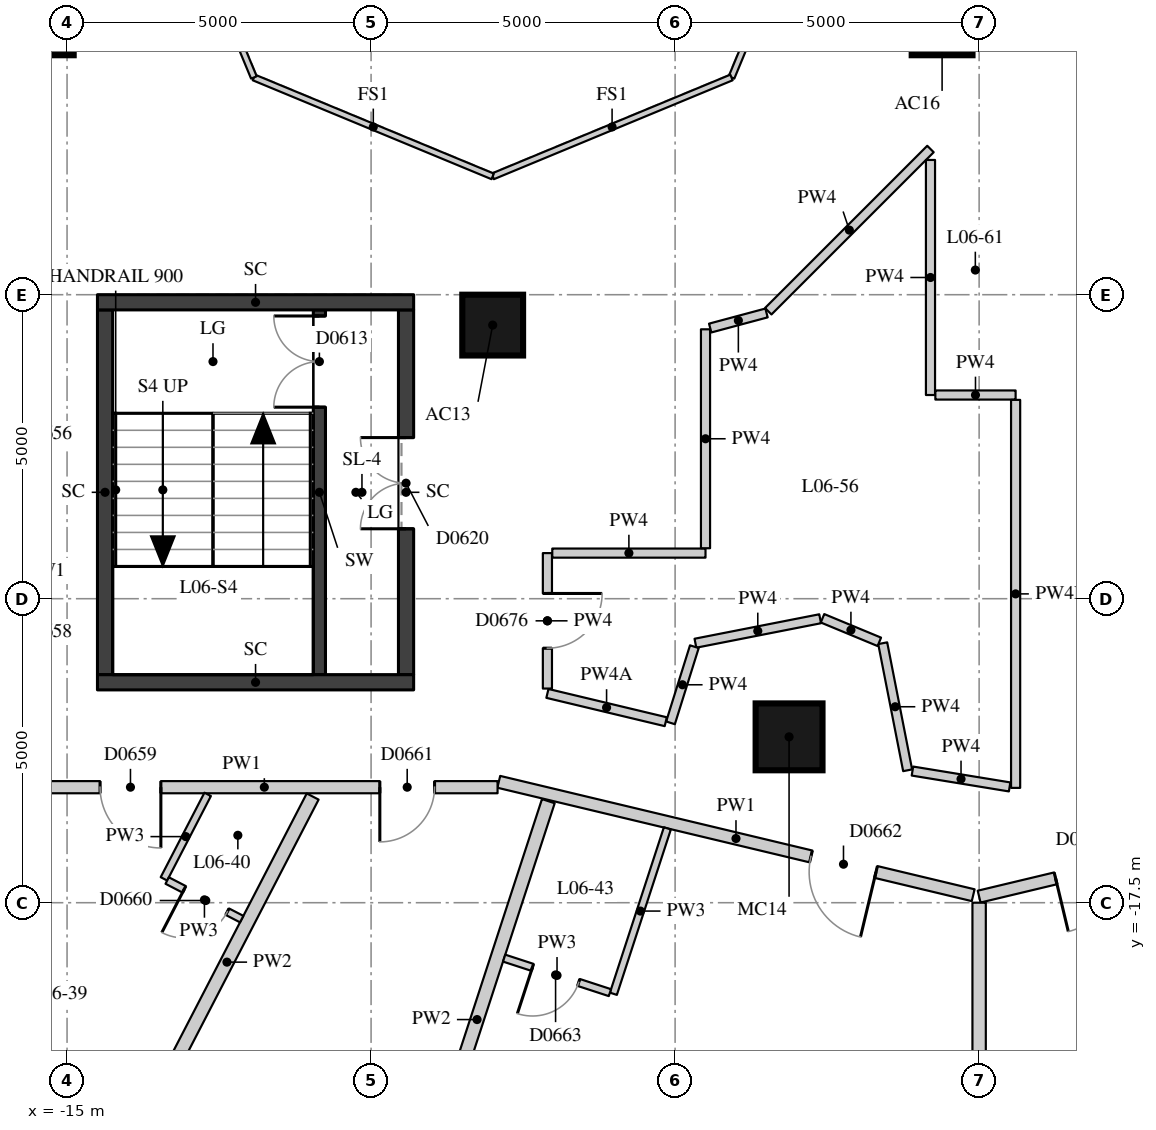
"""IFC4 building model, lengths in metres.
Left out: names, types, materials, properties, quantities, classifications, styles, units other than length and angle.
Written with IfcOpenShell. Run it as: python <this file> out.ifc"""

import sys

from ifc_helpers import new_model, si_unit, direction, frame, frame_2d, origin, origin_2d, place, context, subcontext, project, spatial, rectangle, extrude, element, fill, save


model = new_model("IFC4")
c1 = context("Model", 3, precision=1e-05, world=origin(), true_north=direction((0.0, 1.0)))
c2 = subcontext(c1, "Body", "Model", "MODEL_VIEW")
j1 = project(units=[si_unit("LENGTHUNIT", "METRE"), si_unit("PLANEANGLEUNIT", "RADIAN")], contexts=[c1])
p1 = place(None, origin())
s1 = spatial("IfcSite", under=j1, at=p1, CompositionType="ELEMENT")
p2 = place(p1, origin())
s2 = spatial("IfcBuilding", under=s1, at=p2, CompositionType="ELEMENT")
p3 = place(p2, frame((0.0, 0.0, 28.3)))
s3 = spatial("IfcBuildingStorey", under=s2, at=p3, CompositionType="ELEMENT", Elevation=28.3)
for number, where, z_axis, x_axis in (
    (1, (-15.391, -3.062, 0.0), (0.0, 0.0, 1.0), (1.0, 0.0, 0.0)),
    (2, (-8.0, -8.0, 0.0), (0.0, 0.0, 1.0), (1.0, 0.0, 0.0)),
    (3, (-0.609, -3.062, 0.0), (0.0, 0.0, 1.0), (1.0, 0.0, 0.0)),
):
    element("IfcColumn", number, at=place(p3, frame(where, z_axis=z_axis, x_axis=x_axis)), inside=s3, PredefinedType="COLUMN", context=c2, shape_type="SweptSolid", body=[
        extrude(rectangle(XDim=1.0, YDim=1.0, at=origin_2d()), origin(), (0.0, 0.0, 1.0), 3.3),
    ])
p4 = place(p3, frame((-3.126, -14.772, 0.0), z_axis=(0.0, 0.0, 1.0), x_axis=(1.0, 0.0, 0.0)))
e4 = element("IfcColumn", 4, at=p4, inside=s3, PredefinedType="COLUMN", context=c2, shape_type="SweptSolid", body=[
    extrude(rectangle(XDim=1.1, YDim=1.1, at=origin_2d()), origin(), (0.0, 0.0, 1.0), 3.3),
])
p5 = place(p3, frame((-18.023, -20.044, 0.0), z_axis=(0.0, 0.0, 1.0), x_axis=(0.847635480093, -0.530579016629, 0.0)))
e5 = element("IfcWall", 5, at=p5, inside=s3, PredefinedType="SOLIDWALL", context=c2, shape_type="SweptSolid", body=[
    extrude(rectangle(XDim=3.782, YDim=0.45, at=frame_2d((1.891, 0.0))), origin(), (0.0, 0.0, 1.0), 3.02),
])
p6 = place(p5, frame((0.791, 0.0, 0.4)))
e6 = element("IfcOpeningElement", 6, at=p6, cuts=e5, PredefinedType="OPENING", context=c2, shape_type="SweptSolid", body=[
    extrude(rectangle(XDim=2.2, YDim=1.75, at=frame_2d((1.1, 0.875))), frame((0.0, 0.235, 0.0), z_axis=(0.0, -1.0, 0.0), x_axis=(1.0, 0.0, 0.0)), (0.0, 0.0, 1.0), 0.47),
])
p7 = place(p3, frame((-10.85, -13.75, 0.0), z_axis=(0.0, 0.0, 1.0), x_axis=(0.0, 1.0, 0.0)))
e7 = element("IfcWall", 7, at=p7, inside=s3, PredefinedType="SHEAR", context=c2, shape_type="SweptSolid", body=[
    extrude(rectangle(XDim=6.0, YDim=0.2, at=frame_2d((3.0, 0.0))), origin(), (0.0, 0.0, 1.0), 3.02),
])
p8 = place(p7, frame((4.4, 0.0, 0.0)))
e8 = element("IfcOpeningElement", 8, at=p8, cuts=e7, PredefinedType="OPENING", context=c2, shape_type="SweptSolid", body=[
    extrude(rectangle(XDim=1.5, YDim=2.1, at=frame_2d((0.75, 1.05))), frame((0.0, 0.11, 0.0), z_axis=(0.0, -1.0, 0.0), x_axis=(1.0, 0.0, 0.0)), (0.0, 0.0, 1.0), 0.22),
])
p9 = place(p3, frame((-14.375, -13.75, -0.28), z_axis=(0.0, 0.0, 1.0), x_axis=(0.0, 1.0, 0.0)))
e9 = element("IfcWall", 9, at=p9, inside=s3, PredefinedType="SHEAR", context=c2, shape_type="SweptSolid", body=[
    extrude(rectangle(XDim=6.0, YDim=0.25, at=frame_2d((3.0, 0.0))), origin(), (0.0, 0.0, 1.0), 3.3),
])
p10 = place(p3, frame((-9.425, -13.75, -0.28), z_axis=(0.0, 0.0, 1.0), x_axis=(0.0, 1.0, 0.0)))
e10 = element("IfcWall", 10, at=p10, inside=s3, PredefinedType="SHEAR", context=c2, shape_type="SweptSolid", body=[
    extrude(rectangle(XDim=6.0, YDim=0.25, at=frame_2d((3.0, 0.0))), origin(), (0.0, 0.0, 1.0), 3.3),
])
p11 = place(p10, frame((2.4, 0.0, 0.28)))
e11 = element("IfcOpeningElement", 11, at=p11, cuts=e10, PredefinedType="OPENING", context=c2, shape_type="SweptSolid", body=[
    extrude(rectangle(XDim=1.5, YDim=2.1, at=frame_2d((0.75, 1.05))), frame((0.0, 0.135, 0.0), z_axis=(0.0, -1.0, 0.0), x_axis=(1.0, 0.0, 0.0)), (0.0, 0.0, 1.0), 0.27),
])
for number, where, z_axis, x_axis in (
    (12, (-14.5, -7.625, -0.28), (0.0, 0.0, 1.0), (1.0, 0.0, 0.0)),
    (13, (-14.5, -13.875, -0.28), (0.0, 0.0, 1.0), (1.0, 0.0, 0.0)),
):
    element("IfcWall", number, at=place(p3, frame(where, z_axis=z_axis, x_axis=x_axis)), inside=s3, PredefinedType="SHEAR", context=c2, shape_type="SweptSolid", body=[
        extrude(rectangle(XDim=5.2, YDim=0.25, at=frame_2d((2.6, 0.0))), origin(), (0.0, 0.0, 1.0), 3.3),
    ])
p12 = place(p3, frame((10.488, -14.893, 0.0), z_axis=(0.0, 0.0, 1.0), x_axis=(-0.972603489924, -0.23247032367, 0.0)))
e14 = element("IfcWall", 14, at=p12, inside=s3, PredefinedType="PARTITIONING", context=c2, shape_type="SweptSolid", body=[
    extrude(rectangle(XDim=10.783, YDim=0.2, at=frame_2d((5.392, 0.0))), origin(), (0.0, 0.0, 1.0), 3.02),
])
p13 = place(p12, frame((8.59, 0.0, 0.0)))
e15 = element("IfcOpeningElement", 15, at=p13, cuts=e14, PredefinedType="OPENING", context=c2, shape_type="SweptSolid", body=[
    extrude(rectangle(XDim=0.9, YDim=2.1, at=frame_2d((0.45, 1.05))), frame((0.0, 0.11, 0.0), z_axis=(0.0, -1.0, 0.0), x_axis=(1.0, 0.0, 0.0)), (0.0, 0.0, 1.0), 0.22),
])
p14 = place(p12, frame((5.462, 0.0, 0.0)))
e16 = element("IfcOpeningElement", 16, at=p14, cuts=e14, PredefinedType="OPENING", context=c2, shape_type="SweptSolid", body=[
    extrude(rectangle(XDim=1.0, YDim=2.1, at=frame_2d((0.5, 1.05))), frame((0.0, 0.11, 0.0), z_axis=(0.0, -1.0, 0.0), x_axis=(1.0, 0.0, 0.0)), (0.0, 0.0, 1.0), 0.22),
])
p15 = place(p3, frame((-0.098, -17.377, 0.0), z_axis=(0.0, 0.0, 1.0), x_axis=(-0.97260043732, 0.232483094708, 0.0)))
e17 = element("IfcWall", 17, at=p15, inside=s3, PredefinedType="PARTITIONING", context=c2, shape_type="SweptSolid", body=[
    extrude(rectangle(XDim=8.022, YDim=0.2, at=frame_2d((4.011, 0.0))), origin(), (0.0, 0.0, 1.0), 3.02),
])
p16 = place(p15, frame((1.643, 0.0, 0.0)))
e18 = element("IfcOpeningElement", 18, at=p16, cuts=e17, PredefinedType="OPENING", context=c2, shape_type="SweptSolid", body=[
    extrude(rectangle(XDim=1.1, YDim=2.1, at=frame_2d((0.55, 1.05))), frame((0.0, 0.11, 0.0), z_axis=(0.0, -1.0, 0.0), x_axis=(1.0, 0.0, 0.0)), (0.0, 0.0, 1.0), 0.22),
])
p17 = place(p3, frame((-7.92, -15.6, 0.0), z_axis=(0.0, 0.0, 1.0), x_axis=(-1.0, 0.0, 0.0)))
e19 = element("IfcWall", 19, at=p17, inside=s3, PredefinedType="PARTITIONING", context=c2, shape_type="SweptSolid", body=[
    extrude(rectangle(XDim=7.672, YDim=0.2, at=frame_2d((3.836, 0.0))), origin(), (0.0, 0.0, 1.0), 3.02),
])
p18 = place(p17, frame((5.537, 0.0, 0.0)))
e20 = element("IfcOpeningElement", 20, at=p18, cuts=e19, PredefinedType="OPENING", context=c2, shape_type="SweptSolid", body=[
    extrude(rectangle(XDim=1.0, YDim=2.1, at=frame_2d((0.5, 1.05))), frame((0.0, 0.11, 0.0), z_axis=(0.0, -1.0, 0.0), x_axis=(1.0, 0.0, 0.0)), (0.0, 0.0, 1.0), 0.22),
])
p19 = place(p17, frame((1.036, 0.0, 0.0)))
e21 = element("IfcOpeningElement", 21, at=p19, cuts=e19, PredefinedType="OPENING", context=c2, shape_type="SweptSolid", body=[
    extrude(rectangle(XDim=0.9, YDim=2.1, at=frame_2d((0.45, 1.05))), frame((0.0, 0.11, 0.0), z_axis=(0.0, -1.0, 0.0), x_axis=(1.0, 0.0, 0.0)), (0.0, 0.0, 1.0), 0.22),
])
p20 = place(p3, frame((-1.176, -15.322, 0.0), z_axis=(0.0, 0.0, 1.0), x_axis=(-0.192477233237, 0.981301439256, 0.0)))
e22 = element("IfcWall", 22, at=p20, inside=s3, PredefinedType="PARTITIONING", context=c2, shape_type="SweptSolid", body=[
    extrude(rectangle(XDim=2.13, YDim=0.15, at=frame_2d((1.065, 0.0))), origin(), (0.0, 0.0, 1.0), 3.02),
])
p21 = place(p3, frame((-1.641, -13.209, 0.0), z_axis=(0.0, 0.0, 1.0), x_axis=(-0.923725449546, 0.383055209937, 0.0)))
e23 = element("IfcWall", 23, at=p21, inside=s3, PredefinedType="PARTITIONING", context=c2, shape_type="SweptSolid", body=[
    extrude(rectangle(XDim=1.011, YDim=0.15, at=frame_2d((0.506, 0.0))), origin(), (0.0, 0.0, 1.0), 3.02),
])
p22 = place(p3, frame((-2.615, -12.83, 0.0), z_axis=(0.0, 0.0, 1.0), x_axis=(-0.981297312652, -0.192498270593, 0.0)))
e24 = element("IfcWall", 24, at=p22, inside=s3, PredefinedType="PARTITIONING", context=c2, shape_type="SweptSolid", body=[
    extrude(rectangle(XDim=2.09, YDim=0.15, at=frame_2d((1.045, 0.0))), origin(), (0.0, 0.0, 1.0), 3.02),
])
p23 = place(p3, frame((-4.683, -13.289, 0.0), z_axis=(0.0, 0.0, 1.0), x_axis=(-0.298931613931, -0.954274536071, 0.0)))
e25 = element("IfcWall", 25, at=p23, inside=s3, PredefinedType="PARTITIONING", context=c2, shape_type="SweptSolid", body=[
    extrude(rectangle(XDim=1.312, YDim=0.15, at=frame_2d((0.656, 0.0))), origin(), (0.0, 0.0, 1.0), 3.02),
])
p24 = place(p3, frame((-5.154, -14.523, 0.0), z_axis=(0.0, 0.0, 1.0), x_axis=(-0.97258848944, 0.232533073366, 0.0)))
e26 = element("IfcWall", 26, at=p24, inside=s3, PredefinedType="PARTITIONING", context=c2, shape_type="SweptSolid", body=[
    extrude(rectangle(XDim=2.001, YDim=0.15, at=frame_2d((1.0, 0.0))), origin(), (0.0, 0.0, 1.0), 2.57),
])
p25 = place(p3, frame((-7.1, -13.978, 0.0), z_axis=(0.0, 0.0, 1.0), x_axis=(0.0, 1.0, 0.0)))
e27 = element("IfcWall", 27, at=p25, inside=s3, PredefinedType="PARTITIONING", context=c2, shape_type="SweptSolid", body=[
    extrude(rectangle(XDim=2.228, YDim=0.15, at=frame_2d((1.114, 0.0))), origin(), (0.0, 0.0, 1.0), 3.02),
])
p26 = place(p25, frame((0.664, 0.0, 0.0)))
e28 = element("IfcOpeningElement", 28, at=p26, cuts=e27, PredefinedType="OPENING", context=c2, shape_type="SweptSolid", body=[
    extrude(rectangle(XDim=0.9, YDim=2.1, at=frame_2d((0.45, 1.05))), frame((0.0, 0.085, 0.0), z_axis=(0.0, -1.0, 0.0), x_axis=(1.0, 0.0, 0.0)), (0.0, 0.0, 1.0), 0.17),
])
p27 = place(p3, frame((-7.02, -11.75, 0.0), z_axis=(0.0, 0.0, 1.0), x_axis=(1.0, 0.0, 0.0)))
e29 = element("IfcWall", 29, at=p27, inside=s3, PredefinedType="PARTITIONING", context=c2, shape_type="SweptSolid", body=[
    extrude(rectangle(XDim=2.52, YDim=0.15, at=frame_2d((1.26, 0.0))), origin(), (0.0, 0.0, 1.0), 3.02),
])
p28 = place(p3, frame((-4.5, -11.67, 0.0), z_axis=(0.0, 0.0, 1.0), x_axis=(0.0, 1.0, 0.0)))
e30 = element("IfcWall", 30, at=p28, inside=s3, PredefinedType="PARTITIONING", context=c2, shape_type="SweptSolid", body=[
    extrude(rectangle(XDim=3.601, YDim=0.15, at=frame_2d((1.8, 0.0))), origin(), (0.0, 0.0, 1.0), 3.02),
])
p29 = place(p3, frame((-4.423, -8.049, 0.0), z_axis=(0.0, 0.0, 1.0), x_axis=(0.96590031435, 0.25891423819, 0.0)))
e31 = element("IfcWall", 31, at=p29, inside=s3, PredefinedType="PARTITIONING", context=c2, shape_type="SweptSolid", body=[
    extrude(rectangle(XDim=0.959, YDim=0.15, at=frame_2d((0.479, 0.0))), origin(), (0.0, 0.0, 1.0), 3.02),
])
p30 = place(p3, frame((-3.468, -7.772, 0.0), z_axis=(0.0, 0.0, 1.0), x_axis=(0.707106781187, 0.707106781187, 0.0)))
e32 = element("IfcWall", 32, at=p30, inside=s3, PredefinedType="PARTITIONING", context=c2, shape_type="SweptSolid", body=[
    extrude(rectangle(XDim=3.773, YDim=0.15, at=frame_2d((1.887, 0.0))), origin(), (0.0, 0.0, 1.0), 3.02),
])
p31 = place(p3, frame((-0.8, -5.284, 0.0), z_axis=(0.0, 0.0, 1.0), x_axis=(0.0, -1.0, 0.0)))
e33 = element("IfcWall", 33, at=p31, inside=s3, PredefinedType="PARTITIONING", context=c2, shape_type="SweptSolid", body=[
    extrude(rectangle(XDim=3.866, YDim=0.15, at=frame_2d((1.933, 0.0))), origin(), (0.0, 0.0, 1.0), 3.02),
])
p32 = place(p3, frame((-0.72, -9.15, 0.0), z_axis=(0.0, 0.0, 1.0), x_axis=(1.0, 0.0, 0.0)))
e34 = element("IfcWall", 34, at=p32, inside=s3, PredefinedType="PARTITIONING", context=c2, shape_type="SweptSolid", body=[
    extrude(rectangle(XDim=1.32, YDim=0.15, at=frame_2d((0.66, 0.0))), origin(), (0.0, 0.0, 1.0), 3.02),
])
p33 = place(p3, frame((0.6, -9.23, 0.0), z_axis=(0.0, 0.0, 1.0), x_axis=(0.0, -1.0, 0.0)))
e35 = element("IfcWall", 35, at=p33, inside=s3, PredefinedType="PARTITIONING", context=c2, shape_type="SweptSolid", body=[
    extrude(rectangle(XDim=6.382, YDim=0.15, at=frame_2d((3.191, 0.0))), origin(), (0.0, 0.0, 1.0), 2.47),
])
p34 = place(p3, frame((0.501, -15.596, 0.0), z_axis=(0.0, 0.0, 1.0), x_axis=(-0.986922601781, 0.161194845119, 0.0)))
e36 = element("IfcWall", 36, at=p34, inside=s3, PredefinedType="PARTITIONING", context=c2, shape_type="SweptSolid", body=[
    extrude(rectangle(XDim=1.619, YDim=0.15, at=frame_2d((0.81, 0.0))), origin(), (0.0, 0.0, 1.0), 3.02),
])
p35 = place(p3, frame((-13.78, -21.201, 0.0), z_axis=(0.0, 0.0, 1.0), x_axis=(0.459699000582, 0.888074787878, 0.0)))
e37 = element("IfcWall", 37, at=p35, inside=s3, PredefinedType="PARTITIONING", context=c2, shape_type="SweptSolid", body=[
    extrude(rectangle(XDim=6.134, YDim=0.22, at=frame_2d((3.067, 0.0))), origin(), (0.0, 0.0, 1.0), 3.02),
])
p36 = place(p3, frame((-9.429, -23.014, 0.0), z_axis=(0.0, 0.0, 1.0), x_axis=(0.310261176215, 0.950651356983, 0.0)))
e38 = element("IfcWall", 38, at=p36, inside=s3, PredefinedType="PARTITIONING", context=c2, shape_type="SweptSolid", body=[
    extrude(rectangle(XDim=7.557, YDim=0.22, at=frame_2d((3.779, 0.0))), origin(), (0.0, 0.0, 1.0), 3.02),
])
p37 = place(p3, frame((0.0, -24.5, 0.0), z_axis=(0.0, 0.0, 1.0), x_axis=(0.0, 1.0, 0.0)))
e39 = element("IfcWall", 39, at=p37, inside=s3, PredefinedType="PARTITIONING", context=c2, shape_type="SweptSolid", body=[
    extrude(rectangle(XDim=7.0, YDim=0.22, at=frame_2d((3.5, 0.0))), origin(), (0.0, 0.0, 1.0), 2.47),
])
p38 = place(p3, frame((-12.687, -15.718, 0.0), z_axis=(0.0, 0.0, 1.0), x_axis=(-0.459775159711, -0.888035361071, 0.0)))
e40 = element("IfcWall", 40, at=p38, inside=s3, PredefinedType="PARTITIONING", context=c2, shape_type="SweptSolid", body=[
    extrude(rectangle(XDim=1.565, YDim=0.12, at=frame_2d((0.782, 0.0))), origin(), (0.0, 0.0, 1.0), 3.02),
])
p39 = place(p3, frame((-5.127, -16.277, 0.0), z_axis=(0.0, 0.0, 1.0), x_axis=(-0.310206676877, -0.950669142037, 0.0)))
e41 = element("IfcWall", 41, at=p39, inside=s3, PredefinedType="PARTITIONING", context=c2, shape_type="SweptSolid", body=[
    extrude(rectangle(XDim=2.862, YDim=0.12, at=frame_2d((1.431, 0.0))), origin(), (0.0, 0.0, 1.0), 3.02),
])
p40 = place(p3, frame((-13.353, -17.135, 0.0), z_axis=(0.0, 0.0, 1.0), x_axis=(0.888075681402, -0.459697274413, 0.0)))
e42 = element("IfcWall", 42, at=p40, inside=s3, PredefinedType="PARTITIONING", context=c2, shape_type="SweptSolid", body=[
    extrude(rectangle(XDim=1.38, YDim=0.12, at=frame_2d((0.69, 0.0))), origin(), (0.0, 0.0, 1.0), 3.02),
])
p41 = place(p40, frame((0.315, 0.0, 0.0)))
e43 = element("IfcOpeningElement", 43, at=p41, cuts=e42, PredefinedType="OPENING", context=c2, shape_type="SweptSolid", body=[
    extrude(rectangle(XDim=0.8, YDim=2.1, at=frame_2d((0.4, 1.05))), frame((0.0, 0.07, 0.0), z_axis=(0.0, -1.0, 0.0), x_axis=(1.0, 0.0, 0.0)), (0.0, 0.0, 1.0), 0.14),
])
p42 = place(p3, frame((-6.072, -18.979, 0.0), z_axis=(0.0, 0.0, 1.0), x_axis=(-0.950678536911, 0.31017788357, 0.0)))
e44 = element("IfcWall", 44, at=p42, inside=s3, PredefinedType="PARTITIONING", context=c2, shape_type="SweptSolid", body=[
    extrude(rectangle(XDim=1.83, YDim=0.12, at=frame_2d((0.915, 0.0))), origin(), (0.0, 0.0, 1.0), 3.02),
])
p43 = place(p42, frame((0.54, 0.0, 0.0)))
e45 = element("IfcOpeningElement", 45, at=p43, cuts=e44, PredefinedType="OPENING", context=c2, shape_type="SweptSolid", body=[
    extrude(rectangle(XDim=0.8, YDim=2.1, at=frame_2d((0.4, 1.05))), frame((0.0, 0.07, 0.0), z_axis=(0.0, -1.0, 0.0), x_axis=(1.0, 0.0, 0.0)), (0.0, 0.0, 1.0), 0.14),
])
for number, where, z_axis, x_axis in (
    (46, (-2.446, 0.0, 0.0), (0.0, 0.0, 1.0), (-0.383, -0.924, 0.0)),
    (47, (-4.073, -3.927, 0.0), (0.0, 0.0, 1.0), (-0.924, -0.383, 0.0)),
    (48, (-8.0, -5.554, 0.0), (0.0, 0.0, 1.0), (-0.924, 0.383, 0.0)),
    (49, (-11.927, -3.927, 0.0), (0.0, 0.0, 1.0), (-0.383, 0.924, 0.0)),
):
    element("IfcWall", number, at=place(p3, frame(where, z_axis=z_axis, x_axis=x_axis)), inside=s3, PredefinedType="PARTITIONING", context=c2, shape_type="SweptSolid", body=[
        extrude(rectangle(XDim=4.251, YDim=0.1, at=frame_2d((2.125, 0.0))), origin(), (0.0, 0.0, 1.0), 3.02),
    ])
p44 = place(p8, origin())
e50 = element("IfcDoor", 50, at=p44, inside=s3, OperationType="DOUBLE_DOOR_SINGLE_SWING", PredefinedType="DOOR", context=c2, shape_type="SweptSolid", body=[
    extrude(rectangle(XDim=1.5, YDim=2.1, at=frame_2d((0.75, 1.05))), frame((0.0, 0.025, 0.0), z_axis=(0.0, -1.0, 0.0), x_axis=(1.0, 0.0, 0.0)), (0.0, 0.0, 1.0), 0.05),
])
fill(e8, e50)
p45 = place(p11, origin())
e51 = element("IfcDoor", 51, at=p45, inside=s3, OperationType="DOUBLE_DOOR_SINGLE_SWING", PredefinedType="DOOR", context=c2, shape_type="SweptSolid", body=[
    extrude(rectangle(XDim=1.5, YDim=2.1, at=frame_2d((0.75, 1.05))), frame((0.0, 0.025, 0.0), z_axis=(0.0, -1.0, 0.0), x_axis=(1.0, 0.0, 0.0)), (0.0, 0.0, 1.0), 0.05),
])
fill(e11, e51)
p46 = place(p18, origin())
e52 = element("IfcDoor", 52, at=p46, inside=s3, OperationType="SINGLE_SWING_LEFT", PredefinedType="DOOR", context=c2, shape_type="SweptSolid", body=[
    extrude(rectangle(XDim=1.0, YDim=2.1, at=frame_2d((0.5, 1.05))), frame((0.0, 0.025, 0.0), z_axis=(0.0, -1.0, 0.0), x_axis=(1.0, 0.0, 0.0)), (0.0, 0.0, 1.0), 0.05),
])
fill(e20, e52)
p47 = place(p41, origin())
e53 = element("IfcDoor", 53, at=p47, inside=s3, OperationType="SINGLE_SWING_RIGHT", PredefinedType="DOOR", context=c2, shape_type="SweptSolid", body=[
    extrude(rectangle(XDim=0.8, YDim=2.1, at=frame_2d((0.4, 1.05))), frame((0.0, 0.025, 0.0), z_axis=(0.0, -1.0, 0.0), x_axis=(1.0, 0.0, 0.0)), (0.0, 0.0, 1.0), 0.05),
])
fill(e43, e53)
p48 = place(p19, origin())
e54 = element("IfcDoor", 54, at=p48, inside=s3, OperationType="SINGLE_SWING_RIGHT", PredefinedType="DOOR", context=c2, shape_type="SweptSolid", body=[
    extrude(rectangle(XDim=0.9, YDim=2.1, at=frame_2d((0.45, 1.05))), frame((0.0, 0.025, 0.0), z_axis=(0.0, -1.0, 0.0), x_axis=(1.0, 0.0, 0.0)), (0.0, 0.0, 1.0), 0.05),
])
fill(e21, e54)
p49 = place(p16, origin())
e55 = element("IfcDoor", 55, at=p49, inside=s3, OperationType="SINGLE_SWING_LEFT", PredefinedType="DOOR", context=c2, shape_type="SweptSolid", body=[
    extrude(rectangle(XDim=1.1, YDim=2.1, at=frame_2d((0.55, 1.05))), frame((0.0, 0.025, 0.0), z_axis=(0.0, -1.0, 0.0), x_axis=(1.0, 0.0, 0.0)), (0.0, 0.0, 1.0), 0.05),
])
fill(e18, e55)
p50 = place(p43, origin())
e56 = element("IfcDoor", 56, at=p50, inside=s3, OperationType="SINGLE_SWING_RIGHT", PredefinedType="DOOR", context=c2, shape_type="SweptSolid", body=[
    extrude(rectangle(XDim=0.8, YDim=2.1, at=frame_2d((0.4, 1.05))), frame((0.0, 0.025, 0.0), z_axis=(0.0, -1.0, 0.0), x_axis=(1.0, 0.0, 0.0)), (0.0, 0.0, 1.0), 0.05),
])
fill(e45, e56)
p51 = place(p13, origin())
e57 = element("IfcDoor", 57, at=p51, inside=s3, OperationType="SINGLE_SWING_RIGHT", PredefinedType="DOOR", context=c2, shape_type="SweptSolid", body=[
    extrude(rectangle(XDim=0.9, YDim=2.1, at=frame_2d((0.45, 1.05))), frame((0.0, 0.025, 0.0), z_axis=(0.0, -1.0, 0.0), x_axis=(1.0, 0.0, 0.0)), (0.0, 0.0, 1.0), 0.05),
])
fill(e15, e57)
p52 = place(p26, origin())
e58 = element("IfcDoor", 58, at=p52, inside=s3, OperationType="SINGLE_SWING_LEFT", PredefinedType="DOOR", context=c2, shape_type="SweptSolid", body=[
    extrude(rectangle(XDim=0.9, YDim=2.1, at=frame_2d((0.45, 1.05))), frame((0.0, 0.025, 0.0), z_axis=(0.0, -1.0, 0.0), x_axis=(1.0, 0.0, 0.0)), (0.0, 0.0, 1.0), 0.05),
])
fill(e28, e58)
save(model, sys.argv[1])
